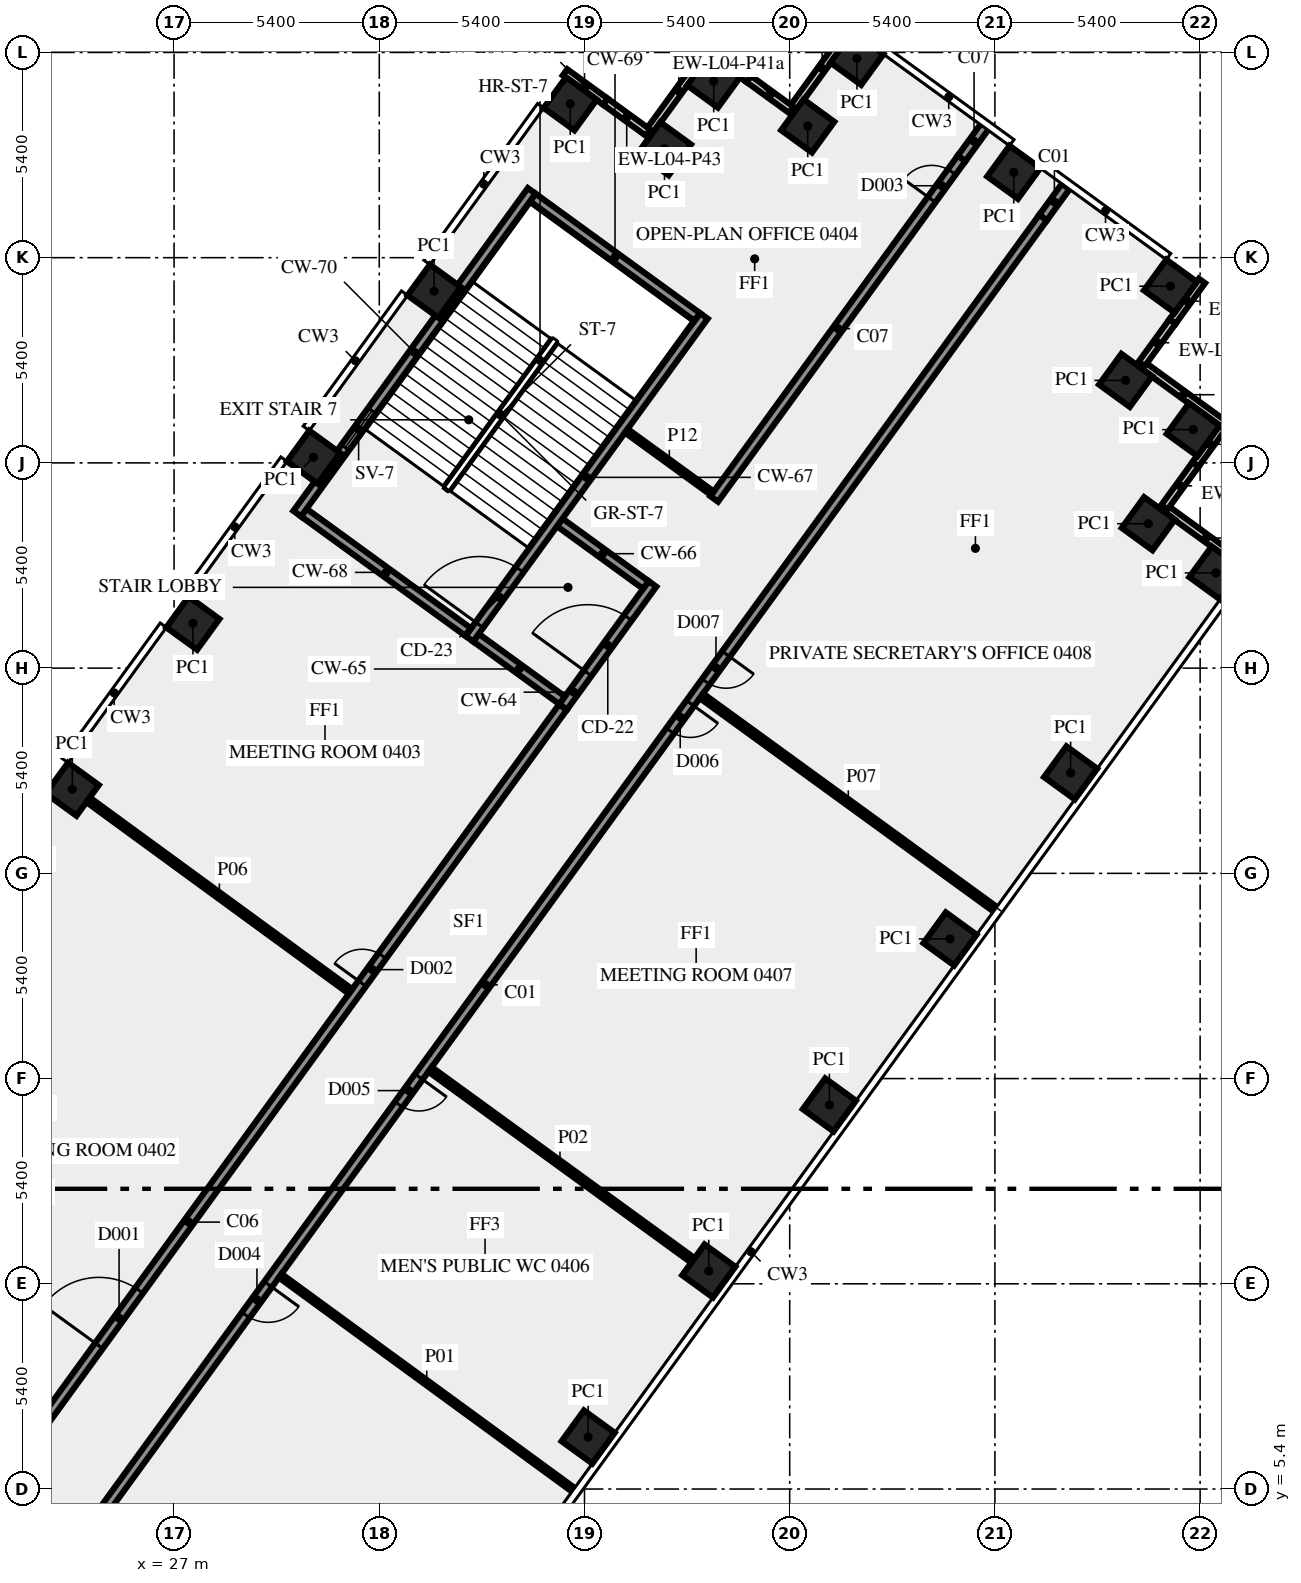
"""IFC4 building model, lengths in metres.
Left out: names, types, materials, properties, quantities, classifications, styles, units other than length and angle.
Written with IfcOpenShell. Run it as: python <this file> out.ifc"""

import sys

from ifc_helpers import new_model, si_unit, direction, frame, frame_2d, origin, origin_2d, place, context, subcontext, project, spatial, rectangle, extrude, element, fill, save


model = new_model("IFC4")
c1 = context("Model", 3, precision=1e-05, world=origin(), true_north=direction((0.0, 1.0)))
c2 = subcontext(c1, "Body", "Model", "MODEL_VIEW")
j1 = project(units=[si_unit("LENGTHUNIT", "METRE"), si_unit("PLANEANGLEUNIT", "RADIAN")], contexts=[c1])
p1 = place(None, origin())
s1 = spatial("IfcSite", under=j1, at=p1, CompositionType="ELEMENT")
p2 = place(p1, origin())
s2 = spatial("IfcBuilding", under=s1, at=p2, CompositionType="ELEMENT")
p3 = place(p2, frame((0.0, 0.0, 20.5)))
s3 = spatial("IfcBuildingStorey", under=s2, at=p3, CompositionType="ELEMENT", Elevation=20.5)
for number, where, z_axis, x_axis in (
    (1, (37.896, 6.769, 0.0), (0.0, 0.0, 1.0), (0.588, 0.809, 0.0)),
    (2, (41.07, 11.137, 0.0), (0.0, 0.0, 1.0), (0.588, 0.809, 0.0)),
    (3, (44.244, 15.506, 0.0), (0.0, 0.0, 1.0), (0.588, 0.809, 0.0)),
    (4, (47.418, 19.875, 0.0), (0.0, 0.0, 1.0), (0.588, 0.809, 0.0)),
    (5, (50.592, 24.243, 0.0), (0.0, 0.0, 1.0), (0.588, 0.809, 0.0)),
    (6, (54.415, 29.505, 0.0), (0.0, 0.0, 1.0), (0.588, 0.809, 0.0)),
    (7, (52.636, 30.8, 0.0), (0.0, 0.0, 1.0), (-0.809, 0.588, 0.0)),
    (8, (53.82, 33.275, 0.0), (0.0, 0.0, 1.0), (-0.809, 0.588, 0.0)),
    (9, (52.039, 34.571, 0.0), (0.0, 0.0, 1.0), (0.588, 0.809, 0.0)),
    (10, (53.22, 37.05, 0.0), (0.0, 0.0, 1.0), (-0.809, 0.588, 0.0)),
    (11, (49.096, 40.047, 0.0), (0.0, 0.0, 1.0), (-0.809, 0.588, 0.0)),
    (12, (44.97, 43.045, 0.0), (0.0, 0.0, 1.0), (-0.809, 0.588, 0.0)),
    (13, (43.675, 41.265, 0.0), (0.0, 0.0, 1.0), (-0.809, 0.588, 0.0)),
    (14, (41.2, 42.445, 0.0), (0.0, 0.0, 1.0), (-0.588, -0.809, 0.0)),
    (15, (39.906, 40.666, 0.0), (0.0, 0.0, 1.0), (-0.588, -0.809, 0.0)),
    (16, (37.425, 41.85, 0.0), (0.0, 0.0, 1.0), (-0.588, -0.809, 0.0)),
    (17, (33.843, 36.919, 0.0), (0.0, 0.0, 1.0), (-0.588, -0.809, 0.0)),
    (18, (30.669, 32.55, 0.0), (0.0, 0.0, 1.0), (-0.588, -0.809, 0.0)),
    (19, (27.495, 28.181, 0.0), (0.0, 0.0, 1.0), (-0.588, -0.809, 0.0)),
    (20, (24.321, 23.812, 0.0), (0.0, 0.0, 1.0), (-0.588, -0.809, 0.0)),
):
    element("IfcColumn", number, at=place(p3, frame(where, z_axis=z_axis, x_axis=x_axis)), inside=s3, PredefinedType="COLUMN", context=c2, shape_type="SweptSolid", body=[
        extrude(rectangle(XDim=1.0, YDim=1.0, at=origin_2d()), origin(), (0.0, 0.0, 1.0), 3.9),
    ])
p4 = place(p3, frame((55.247, 29.629, 0.0), z_axis=(0.0, 0.0, 1.0), x_axis=(-0.809033161865, 0.587762999008, 0.0)))
e21 = element("IfcWall", 21, at=p4, inside=s3, PredefinedType="SOLIDWALL", context=c2, shape_type="SweptSolid", body=[
    extrude(rectangle(XDim=2.7, YDim=0.2, at=frame_2d((1.35, 0.0))), origin(), (0.0, 0.0, 1.0), 3.9),
])
p5 = place(p3, frame((53.06, 31.233, 0.0), z_axis=(0.0, 0.0, 1.0), x_axis=(0.587776137069, 0.809023616894, 0.0)))
e22 = element("IfcWall", 22, at=p5, inside=s3, PredefinedType="SOLIDWALL", context=c2, shape_type="SweptSolid", body=[
    extrude(rectangle(XDim=1.395, YDim=0.2, at=frame_2d((0.697, 0.0))), origin(), (0.0, 0.0, 1.0), 2.9),
])
p6 = place(p3, frame((53.88, 32.361, 0.0), z_axis=(0.0, 0.0, 1.0), x_axis=(0.587871379726, 0.808954412127, 0.0)))
e23 = element("IfcWall", 23, at=p6, inside=s3, PredefinedType="SOLIDWALL", context=c2, shape_type="SweptSolid", body=[
    extrude(rectangle(XDim=1.305, YDim=0.2, at=frame_2d((0.653, 0.0))), origin(), (0.0, 0.0, 1.0), 3.9),
])
p7 = place(p3, frame((54.65, 33.4, 0.0), z_axis=(0.0, 0.0, 1.0), x_axis=(-0.809033161865, 0.587762999008, 0.0)))
e24 = element("IfcWall", 24, at=p7, inside=s3, PredefinedType="SOLIDWALL", context=c2, shape_type="SweptSolid", body=[
    extrude(rectangle(XDim=2.7, YDim=0.2, at=frame_2d((1.35, 0.0))), origin(), (0.0, 0.0, 1.0), 3.9),
])
p8 = place(p3, frame((52.463, 35.004, 0.0), z_axis=(0.0, 0.0, 1.0), x_axis=(0.587782252522, 0.809019173827, 0.0)))
e25 = element("IfcWall", 25, at=p8, inside=s3, PredefinedType="SOLIDWALL", context=c2, shape_type="SweptSolid", body=[
    extrude(rectangle(XDim=1.379, YDim=0.2, at=frame_2d((0.69, 0.0))), origin(), (0.0, 0.0, 1.0), 2.9),
])
p9 = place(p3, frame((53.273, 36.12, 0.0), z_axis=(0.0, 0.0, 1.0), x_axis=(0.58786388341, 0.808959859686, 0.0)))
e26 = element("IfcWall", 26, at=p9, inside=s3, PredefinedType="SOLIDWALL", context=c2, shape_type="SweptSolid", body=[
    extrude(rectangle(XDim=1.321, YDim=0.2, at=frame_2d((0.66, 0.0))), origin(), (0.0, 0.0, 1.0), 3.9),
])
p10 = place(p3, frame((44.846, 43.875, 0.0), z_axis=(0.0, 0.0, 1.0), x_axis=(-0.587822180636, -0.808990163075, 0.0)))
e27 = element("IfcWall", 27, at=p10, inside=s3, PredefinedType="SOLIDWALL", context=c2, shape_type="SweptSolid", body=[
    extrude(rectangle(XDim=2.7, YDim=0.2, at=frame_2d((1.35, 0.0))), origin(), (0.0, 0.0, 1.0), 3.9),
])
p11 = place(p3, frame((43.242, 41.688, 0.0), z_axis=(0.0, 0.0, 1.0), x_axis=(-0.808926734208, 0.5879094647, 0.0)))
e28 = element("IfcWall", 28, at=p11, inside=s3, PredefinedType="SOLIDWALL", context=c2, shape_type="SweptSolid", body=[
    extrude(rectangle(XDim=1.384, YDim=0.2, at=frame_2d((0.692, 0.0))), origin(), (0.0, 0.0, 1.0), 2.9),
])
p12 = place(p3, frame((42.123, 42.502, 0.0), z_axis=(0.0, 0.0, 1.0), x_axis=(-0.809056865039, 0.587730371117, 0.0)))
e29 = element("IfcWall", 29, at=p12, inside=s3, PredefinedType="SOLIDWALL", context=c2, shape_type="SweptSolid", body=[
    extrude(rectangle(XDim=1.316, YDim=0.2, at=frame_2d((0.658, 0.0))), origin(), (0.0, 0.0, 1.0), 3.9),
])
p13 = place(p3, frame((41.075, 43.278, 0.0), z_axis=(0.0, 0.0, 1.0), x_axis=(-0.587806000234, -0.809001919707, 0.0)))
e30 = element("IfcWall", 30, at=p13, inside=s3, PredefinedType="SOLIDWALL", context=c2, shape_type="SweptSolid", body=[
    extrude(rectangle(XDim=2.7, YDim=0.2, at=frame_2d((1.35, 0.0))), origin(), (0.0, 0.0, 1.0), 3.9),
])
p14 = place(p3, frame((39.471, 41.091, 0.0), z_axis=(0.0, 0.0, 1.0), x_axis=(-0.809002762913, 0.58780483972, 0.0)))
e31 = element("IfcWall", 31, at=p14, inside=s3, PredefinedType="SOLIDWALL", context=c2, shape_type="SweptSolid", body=[
    extrude(rectangle(XDim=1.385, YDim=0.2, at=frame_2d((0.693, 0.0))), origin(), (0.0, 0.0, 1.0), 2.9),
])
p15 = place(p3, frame((38.351, 41.905, 0.0), z_axis=(0.0, 0.0, 1.0), x_axis=(-0.809065186597, 0.587718915671, 0.0)))
e32 = element("IfcWall", 32, at=p15, inside=s3, PredefinedType="SOLIDWALL", context=c2, shape_type="SweptSolid", body=[
    extrude(rectangle(XDim=1.315, YDim=0.2, at=frame_2d((0.657, 0.0))), origin(), (0.0, 0.0, 1.0), 3.9),
])
p16 = place(p3, frame((37.238, 25.98, 0.0), z_axis=(0.0, 0.0, 1.0), x_axis=(0.587772420479, 0.809026317077, 0.0)))
e33 = element("IfcWall", 33, at=p16, inside=s3, PredefinedType="SHEAR", context=c2, shape_type="SweptSolid", body=[
    extrude(rectangle(XDim=4.0, YDim=0.25, at=frame_2d((2.0, 0.0))), origin(), (0.0, 0.0, 1.0), 3.9),
])
p17 = place(p16, frame((1.1, 0.0, 0.0)))
e34 = element("IfcOpeningElement", 34, at=p17, cuts=e33, PredefinedType="OPENING", context=c2, shape_type="SweptSolid", body=[
    extrude(rectangle(XDim=1.8, YDim=2.1, at=frame_2d((0.9, 1.05))), frame((0.0, 0.135, 0.0), z_axis=(0.0, -1.0, 0.0), x_axis=(1.0, 0.0, 0.0)), (0.0, 0.0, 1.0), 0.27),
])
for number, where, z_axis, x_axis in (
    (35, (37.21, 26.154, 0.0), (0.0, 0.0, 1.0), (-0.809, 0.588, 0.0)),
    (36, (39.414, 29.188, 0.0), (0.0, 0.0, 1.0), (-0.809, 0.588, 0.0)),
):
    element("IfcWall", number, at=place(p3, frame(where, z_axis=z_axis, x_axis=x_axis)), inside=s3, PredefinedType="SHEAR", context=c2, shape_type="SweptSolid", body=[
        extrude(rectangle(XDim=2.8, YDim=0.25, at=frame_2d((1.4, 0.0))), origin(), (0.0, 0.0, 1.0), 3.9),
    ])
p18 = place(p3, frame((34.77, 27.772, 0.0), z_axis=(0.0, 0.0, 1.0), x_axis=(0.587795589702, 0.809009483706, 0.0)))
e37 = element("IfcWall", 37, at=p18, inside=s3, PredefinedType="SHEAR", context=c2, shape_type="SweptSolid", body=[
    extrude(rectangle(XDim=10.5, YDim=0.25, at=frame_2d((5.25, 0.0))), origin(), (0.0, 0.0, 1.0), 3.9),
])
p19 = place(p18, frame((0.45, 0.0, 0.0)))
e38 = element("IfcOpeningElement", 38, at=p19, cuts=e37, PredefinedType="OPENING", context=c2, shape_type="SweptSolid", body=[
    extrude(rectangle(XDim=1.8, YDim=2.1, at=frame_2d((0.9, 1.05))), frame((0.0, 0.135, 0.0), z_axis=(0.0, -1.0, 0.0), x_axis=(1.0, 0.0, 0.0)), (0.0, 0.0, 1.0), 0.27),
])
p20 = place(p3, frame((34.742, 27.947, 0.0), z_axis=(0.0, 0.0, 1.0), x_axis=(-0.8089984606, 0.587810760999, 0.0)))
e39 = element("IfcWall", 39, at=p20, inside=s3, PredefinedType="SHEAR", context=c2, shape_type="SweptSolid", body=[
    extrude(rectangle(XDim=5.35, YDim=0.25, at=frame_2d((2.675, 0.0))), origin(), (0.0, 0.0, 1.0), 3.9),
])
p21 = place(p3, frame((40.767, 36.24, 0.0), z_axis=(0.0, 0.0, 1.0), x_axis=(-0.809020161303, 0.587780893365, 0.0)))
e40 = element("IfcWall", 40, at=p21, inside=s3, PredefinedType="SHEAR", context=c2, shape_type="SweptSolid", body=[
    extrude(rectangle(XDim=5.35, YDim=0.25, at=frame_2d((2.675, 0.0))), origin(), (0.0, 0.0, 1.0), 3.9),
])
p22 = place(p3, frame((30.24, 31.064, 0.0), z_axis=(0.0, 0.0, 1.0), x_axis=(0.587795589702, 0.809009483706, 0.0)))
e41 = element("IfcWall", 41, at=p22, inside=s3, PredefinedType="SHEAR", context=c2, shape_type="SweptSolid", body=[
    extrude(rectangle(XDim=10.5, YDim=0.25, at=frame_2d((5.25, 0.0))), origin(), (0.0, 0.0, 1.0), 3.9),
])
p23 = place(p22, frame((2.15, 0.0, 1.0)))
e42 = element("IfcOpeningElement", 42, at=p23, cuts=e41, PredefinedType="OPENING", context=c2, shape_type="SweptSolid", body=[
    extrude(rectangle(XDim=1.2, YDim=1.2, at=frame_2d((0.6, 0.6))), frame((0.0, 0.135, 0.0), z_axis=(0.0, -1.0, 0.0), x_axis=(1.0, 0.0, 0.0)), (0.0, 0.0, 1.0), 0.27),
])
p24 = place(p3, frame((49.869, 38.856, 0.0), z_axis=(0.0, 0.0, 1.0), x_axis=(-0.587784522481, -0.809017524614, 0.0)))
e43 = element("IfcWall", 43, at=p24, inside=s3, PredefinedType="SOLIDWALL", context=c2, shape_type="SweptSolid", body=[
    extrude(rectangle(XDim=49.912, YDim=0.25, at=frame_2d((24.956, 0.0))), origin(), (0.0, 0.0, 1.0), 3.9),
])
p25 = place(p24, frame((27.946, 0.0, 0.0)))
e44 = element("IfcOpeningElement", 44, at=p25, cuts=e43, PredefinedType="OPENING", context=c2, shape_type="SweptSolid", body=[
    extrude(rectangle(XDim=0.9, YDim=2.1, at=frame_2d((0.45, 1.05))), frame((0.0, 0.135, 0.0), z_axis=(0.0, -1.0, 0.0), x_axis=(1.0, 0.0, 0.0)), (0.0, 0.0, 1.0), 0.27),
])
p26 = place(p24, frame((34.697, 0.0, 0.0)))
e45 = element("IfcOpeningElement", 45, at=p26, cuts=e43, PredefinedType="OPENING", context=c2, shape_type="SweptSolid", body=[
    extrude(rectangle(XDim=1.0, YDim=2.1, at=frame_2d((0.5, 1.05))), frame((0.0, 0.135, 0.0), z_axis=(0.0, -1.0, 0.0), x_axis=(1.0, 0.0, 0.0)), (0.0, 0.0, 1.0), 0.27),
])
p27 = place(p24, frame((15.797, 0.0, 0.0)))
e46 = element("IfcOpeningElement", 46, at=p27, cuts=e43, PredefinedType="OPENING", context=c2, shape_type="SweptSolid", body=[
    extrude(rectangle(XDim=0.9, YDim=2.1, at=frame_2d((0.45, 1.05))), frame((0.0, 0.135, 0.0), z_axis=(0.0, -1.0, 0.0), x_axis=(1.0, 0.0, 0.0)), (0.0, 0.0, 1.0), 0.27),
])
p28 = place(p24, frame((14.196, 0.0, 0.0)))
e47 = element("IfcOpeningElement", 47, at=p28, cuts=e43, PredefinedType="OPENING", context=c2, shape_type="SweptSolid", body=[
    extrude(rectangle(XDim=0.9, YDim=2.1, at=frame_2d((0.45, 1.05))), frame((0.0, 0.135, 0.0), z_axis=(0.0, -1.0, 0.0), x_axis=(1.0, 0.0, 0.0)), (0.0, 0.0, 1.0), 0.27),
])
p29 = place(p3, frame((17.545, -1.125, 0.0), z_axis=(0.0, 0.0, 1.0), x_axis=(0.587786323093, 0.809016216391, 0.0)))
e48 = element("IfcWall", 48, at=p29, inside=s3, PredefinedType="SOLIDWALL", context=c2, shape_type="SweptSolid", body=[
    extrude(rectangle(XDim=33.493, YDim=0.25, at=frame_2d((16.747, 0.0))), origin(), (0.0, 0.0, 1.0), 3.9),
])
p30 = place(p29, frame((24.508, 0.0, 0.0)))
e49 = element("IfcOpeningElement", 49, at=p30, cuts=e48, PredefinedType="OPENING", context=c2, shape_type="SweptSolid", body=[
    extrude(rectangle(XDim=0.9, YDim=2.1, at=frame_2d((0.45, 1.05))), frame((0.0, 0.135, 0.0), z_axis=(0.0, -1.0, 0.0), x_axis=(1.0, 0.0, 0.0)), (0.0, 0.0, 1.0), 0.27),
])
p31 = place(p29, frame((12.724, 0.0, 0.0)))
e50 = element("IfcOpeningElement", 50, at=p31, cuts=e48, PredefinedType="OPENING", context=c2, shape_type="SweptSolid", body=[
    extrude(rectangle(XDim=1.8, YDim=2.1, at=frame_2d((0.9, 1.05))), frame((0.0, 0.135, 0.0), z_axis=(0.0, -1.0, 0.0), x_axis=(1.0, 0.0, 0.0)), (0.0, 0.0, 1.0), 0.27),
])
p32 = place(p3, frame((41.213, 31.451, 0.0), z_axis=(0.0, 0.0, 1.0), x_axis=(0.587773291021, 0.809025684612, 0.0)))
e51 = element("IfcWall", 51, at=p32, inside=s3, PredefinedType="SOLIDWALL", context=c2, shape_type="SweptSolid", body=[
    extrude(rectangle(XDim=11.079, YDim=0.25, at=frame_2d((5.539, 0.0))), origin(), (0.0, 0.0, 1.0), 3.9),
])
p33 = place(p32, frame((9.736, 0.0, 0.0)))
e52 = element("IfcOpeningElement", 52, at=p33, cuts=e51, PredefinedType="OPENING", context=c2, shape_type="SweptSolid", body=[
    extrude(rectangle(XDim=0.9, YDim=2.1, at=frame_2d((0.45, 1.05))), frame((0.0, 0.135, 0.0), z_axis=(0.0, -1.0, 0.0), x_axis=(1.0, 0.0, 0.0)), (0.0, 0.0, 1.0), 0.27),
])
p34 = place(p3, frame((29.793, 11.012, 0.0), z_axis=(0.0, 0.0, 1.0), x_axis=(0.807645841498, -0.589667868135, 0.0)))
e53 = element("IfcWall", 53, at=p34, inside=s3, PredefinedType="PARTITIONING", context=c2, shape_type="SweptSolid", body=[
    extrude(rectangle(XDim=9.551, YDim=0.12, at=frame_2d((4.775, 0.0))), origin(), (0.0, 0.0, 1.0), 2.9),
])
p35 = place(p3, frame((40.573, 11.474, 0.0), z_axis=(0.0, 0.0, 1.0), x_axis=(-0.808992136407, 0.587819464829, 0.0)))
e54 = element("IfcWall", 54, at=p35, inside=s3, PredefinedType="PARTITIONING", context=c2, shape_type="SweptSolid", body=[
    extrude(rectangle(XDim=8.45, YDim=0.15, at=frame_2d((4.225, 0.0))), origin(), (0.0, 0.0, 1.0), 3.9),
])
p36 = place(p3, frame((24.742, 23.532, 0.0), z_axis=(0.0, 0.0, 1.0), x_axis=(0.80760412282, -0.589725004391, 0.0)))
e55 = element("IfcWall", 55, at=p36, inside=s3, PredefinedType="PARTITIONING", context=c2, shape_type="SweptSolid", body=[
    extrude(rectangle(XDim=8.545, YDim=0.15, at=frame_2d((4.272, 0.0))), origin(), (0.0, 0.0, 1.0), 3.9),
])
p37 = place(p3, frame((48.605, 20.657, 0.0), z_axis=(0.0, 0.0, 1.0), x_axis=(-0.809102944047, 0.587666934526, 0.0)))
e56 = element("IfcWall", 56, at=p37, inside=s3, PredefinedType="PARTITIONING", context=c2, shape_type="SweptSolid", body=[
    extrude(rectangle(XDim=9.55, YDim=0.15, at=frame_2d((4.775, 0.0))), origin(), (0.0, 0.0, 1.0), 2.9),
])
p38 = place(p3, frame((38.9, 33.245, 0.0), z_axis=(0.0, 0.0, 1.0), x_axis=(0.809090262332, -0.587684394381, 0.0)))
e57 = element("IfcWall", 57, at=p38, inside=s3, PredefinedType="PARTITIONING", context=c2, shape_type="SweptSolid", body=[
    extrude(rectangle(XDim=2.801, YDim=0.12, at=frame_2d((1.4, 0.0))), origin(), (0.0, 0.0, 1.0), 3.9),
])
p39 = place(p3, frame((49.869, 38.856, 0.0), z_axis=(0.0, 0.0, 1.0), x_axis=(0.587725246084, 0.809060588037, 0.0)))
e58 = element("IfcWall", 58, at=p39, inside=s3, PredefinedType="SOLIDWALL", context=c2, shape_type="SweptSolid", body=[
    extrude(rectangle(XDim=1.008, YDim=0.25, at=frame_2d((0.504, 0.0))), origin(), (0.0, 0.0, 1.0), 2.9),
])
p40 = place(p3, frame((47.725, 40.414, 0.0), z_axis=(0.0, 0.0, 1.0), x_axis=(0.587883639643, 0.808945502639, 0.0)))
e59 = element("IfcWall", 59, at=p40, inside=s3, PredefinedType="SOLIDWALL", context=c2, shape_type="SweptSolid", body=[
    extrude(rectangle(XDim=1.109, YDim=0.25, at=frame_2d((0.554, 0.0))), origin(), (0.0, 0.0, 1.0), 2.9),
])
p41 = place(p17, origin())
e60 = element("IfcDoor", 60, at=p41, inside=s3, OperationType="DOUBLE_DOOR_SINGLE_SWING", PredefinedType="DOOR", context=c2, shape_type="SweptSolid", body=[
    extrude(rectangle(XDim=1.8, YDim=2.1, at=frame_2d((0.9, 1.05))), frame((0.0, 0.025, 0.0), z_axis=(0.0, -1.0, 0.0), x_axis=(1.0, 0.0, 0.0)), (0.0, 0.0, 1.0), 0.05),
])
fill(e34, e60)
p42 = place(p19, origin())
e61 = element("IfcDoor", 61, at=p42, inside=s3, OperationType="DOUBLE_DOOR_SINGLE_SWING", PredefinedType="DOOR", context=c2, shape_type="SweptSolid", body=[
    extrude(rectangle(XDim=1.8, YDim=2.1, at=frame_2d((0.9, 1.05))), frame((0.0, 0.025, 0.0), z_axis=(0.0, -1.0, 0.0), x_axis=(1.0, 0.0, 0.0)), (0.0, 0.0, 1.0), 0.05),
])
fill(e38, e61)
p43 = place(p23, origin())
e62 = element("IfcWindow", 62, at=p43, inside=s3, PartitioningType="SINGLE_PANEL", PredefinedType="WINDOW", context=c2, shape_type="SweptSolid", body=[
    extrude(rectangle(XDim=1.2, YDim=1.2, at=frame_2d((0.6, 0.6))), frame((0.0, 0.03, 0.0), z_axis=(0.0, -1.0, 0.0), x_axis=(1.0, 0.0, 0.0)), (0.0, 0.0, 1.0), 0.06),
])
fill(e42, e62)
p44 = place(p33, origin())
e63 = element("IfcDoor", 63, at=p44, inside=s3, OperationType="SINGLE_SWING_RIGHT", PredefinedType="DOOR", context=c2, shape_type="SweptSolid", body=[
    extrude(rectangle(XDim=0.9, YDim=2.1, at=frame_2d((0.45, 1.05))), frame((0.0, 0.025, 0.0), z_axis=(0.0, -1.0, 0.0), x_axis=(1.0, 0.0, 0.0)), (0.0, 0.0, 1.0), 0.05),
])
fill(e52, e63)
p45 = place(p25, origin())
e64 = element("IfcDoor", 64, at=p45, inside=s3, OperationType="SINGLE_SWING_LEFT", PredefinedType="DOOR", context=c2, shape_type="SweptSolid", body=[
    extrude(rectangle(XDim=0.9, YDim=2.1, at=frame_2d((0.45, 1.05))), frame((0.0, 0.025, 0.0), z_axis=(0.0, -1.0, 0.0), x_axis=(1.0, 0.0, 0.0)), (0.0, 0.0, 1.0), 0.05),
])
fill(e44, e64)
p46 = place(p26, origin())
e65 = element("IfcDoor", 65, at=p46, inside=s3, OperationType="SINGLE_SWING_LEFT", PredefinedType="DOOR", context=c2, shape_type="SweptSolid", body=[
    extrude(rectangle(XDim=1.0, YDim=2.1, at=frame_2d((0.5, 1.05))), frame((0.0, 0.025, 0.0), z_axis=(0.0, -1.0, 0.0), x_axis=(1.0, 0.0, 0.0)), (0.0, 0.0, 1.0), 0.05),
])
fill(e45, e65)
p47 = place(p30, origin())
e66 = element("IfcDoor", 66, at=p47, inside=s3, OperationType="SINGLE_SWING_LEFT", PredefinedType="DOOR", context=c2, shape_type="SweptSolid", body=[
    extrude(rectangle(XDim=0.9, YDim=2.1, at=frame_2d((0.45, 1.05))), frame((0.0, 0.025, 0.0), z_axis=(0.0, -1.0, 0.0), x_axis=(1.0, 0.0, 0.0)), (0.0, 0.0, 1.0), 0.05),
])
fill(e49, e66)
p48 = place(p27, origin())
e67 = element("IfcDoor", 67, at=p48, inside=s3, OperationType="SINGLE_SWING_LEFT", PredefinedType="DOOR", context=c2, shape_type="SweptSolid", body=[
    extrude(rectangle(XDim=0.9, YDim=2.1, at=frame_2d((0.45, 1.05))), frame((0.0, 0.025, 0.0), z_axis=(0.0, -1.0, 0.0), x_axis=(1.0, 0.0, 0.0)), (0.0, 0.0, 1.0), 0.05),
])
fill(e46, e67)
p49 = place(p28, origin())
e68 = element("IfcDoor", 68, at=p49, inside=s3, OperationType="SINGLE_SWING_RIGHT", PredefinedType="DOOR", context=c2, shape_type="SweptSolid", body=[
    extrude(rectangle(XDim=0.9, YDim=2.1, at=frame_2d((0.45, 1.05))), frame((0.0, 0.025, 0.0), z_axis=(0.0, -1.0, 0.0), x_axis=(1.0, 0.0, 0.0)), (0.0, 0.0, 1.0), 0.05),
])
fill(e47, e68)
p50 = place(p31, origin())
e69 = element("IfcDoor", 69, at=p50, inside=s3, OperationType="DOUBLE_DOOR_SINGLE_SWING", PredefinedType="DOOR", context=c2, shape_type="SweptSolid", body=[
    extrude(rectangle(XDim=1.8, YDim=2.1, at=frame_2d((0.9, 1.05))), frame((0.0, 0.025, 0.0), z_axis=(0.0, -1.0, 0.0), x_axis=(1.0, 0.0, 0.0)), (0.0, 0.0, 1.0), 0.05),
])
fill(e50, e69)
save(model, sys.argv[1])
